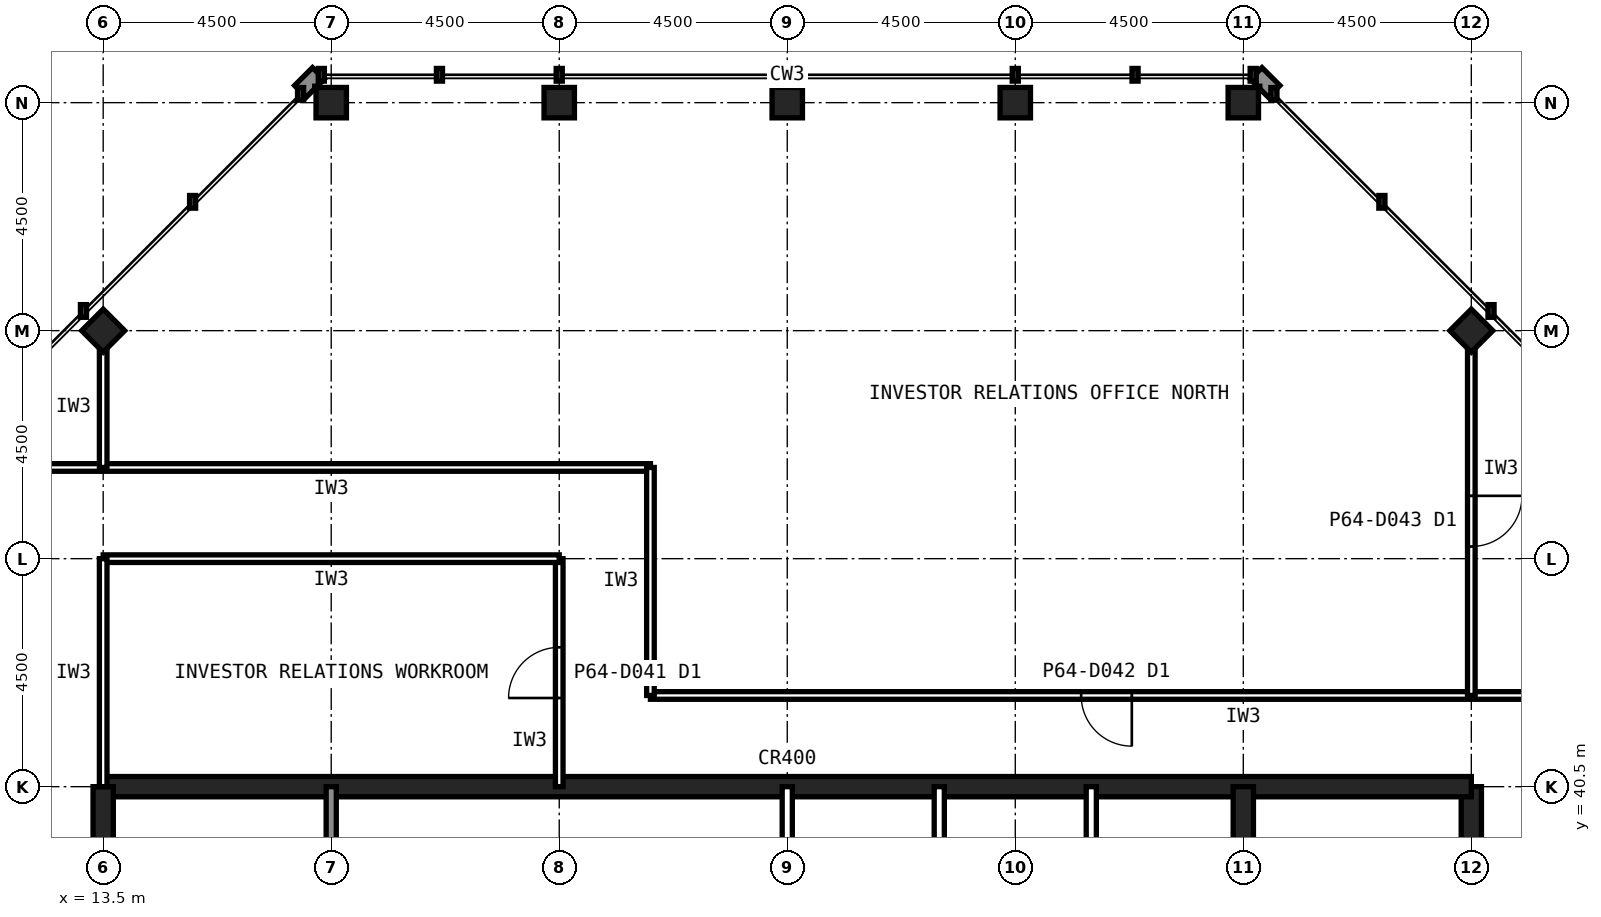
"""IFC4 building model, lengths in metres.
Left out: names, types, materials, properties, quantities, classifications, styles, units other than length and angle.
Written with IfcOpenShell. Run it as: python <this file> out.ifc"""

import sys

from ifc_helpers import new_model, si_unit, direction, frame, frame_2d, origin, origin_2d, place, context, subcontext, project, spatial, rectangle, hollow_rectangle, extrude, element, fill, save


model = new_model("IFC4")
c1 = context("Model", 3, precision=1e-05, world=origin(), true_north=direction((0.0, 1.0)))
c2 = subcontext(c1, "Body", "Model", "MODEL_VIEW")
j1 = project(units=[si_unit("LENGTHUNIT", "METRE"), si_unit("PLANEANGLEUNIT", "RADIAN")], contexts=[c1])
p1 = place(None, origin())
s1 = spatial("IfcSite", under=j1, at=p1, CompositionType="ELEMENT")
p2 = place(p1, origin())
s2 = spatial("IfcBuilding", under=s1, at=p2, CompositionType="ELEMENT")
p3 = place(p2, frame((0.0, 0.0, 270.6)))
s3 = spatial("IfcBuildingStorey", under=s2, at=p3, CompositionType="ELEMENT", Elevation=270.6)
for number, where, z_axis, x_axis in (
    (1, (36.0, 54.0, 0.0), (0.0, 0.0, 1.0), (1.0, 0.0, 0.0)),
    (2, (31.5, 54.0, 0.0), (0.0, 0.0, 1.0), (1.0, 0.0, 0.0)),
    (3, (27.0, 54.0, 0.0), (0.0, 0.0, 1.0), (1.0, 0.0, 0.0)),
    (4, (22.5, 54.0, 0.0), (0.0, 0.0, 1.0), (1.0, 0.0, 0.0)),
    (5, (18.0, 54.0, 0.0), (0.0, 0.0, 1.0), (1.0, 0.0, 0.0)),
    (6, (40.5, 49.5, 0.0), (0.0, 0.0, 1.0), (0.707, 0.707, 0.0)),
    (7, (13.5, 49.5, 0.0), (0.0, 0.0, 1.0), (0.707, 0.707, 0.0)),
):
    element("IfcColumn", number, at=place(p3, frame(where, z_axis=z_axis, x_axis=x_axis)), inside=s3, PredefinedType="COLUMN", context=c2, shape_type="SweptSolid", body=[
        extrude(hollow_rectangle(XDim=0.6, YDim=0.6, WallThickness=0.028, at=origin_2d()), origin(), (0.0, 0.0, 1.0), 4.0),
    ])
p4 = place(p3, frame((40.5, 13.5, 0.0), z_axis=(0.0, 0.0, 1.0), x_axis=(0.0, 1.0, 0.0)))
e8 = element("IfcWall", 8, at=p4, inside=s3, PredefinedType="SHEAR", context=c2, shape_type="SweptSolid", body=[
    extrude(rectangle(XDim=27.0, YDim=0.4, at=frame_2d((13.5, 0.0))), origin(), (0.0, 0.0, 1.0), 4.0),
])
p5 = place(p4, frame((5.85, 0.0, 0.0)))
e9 = element("IfcOpeningElement", 9, at=p5, cuts=e8, PredefinedType="OPENING", context=c2, shape_type="SweptSolid", body=[
    extrude(rectangle(XDim=1.8, YDim=2.1, at=frame_2d((0.9, 1.05))), frame((0.0, 0.21, 0.0), z_axis=(0.0, -1.0, 0.0), x_axis=(1.0, 0.0, 0.0)), (0.0, 0.0, 1.0), 0.42),
])
p6 = place(p4, frame((19.65, 0.0, 0.0)))
e10 = element("IfcOpeningElement", 10, at=p6, cuts=e8, PredefinedType="OPENING", context=c2, shape_type="SweptSolid", body=[
    extrude(rectangle(XDim=1.2, YDim=2.1, at=frame_2d((0.6, 1.05))), frame((0.0, 0.21, 0.0), z_axis=(0.0, -1.0, 0.0), x_axis=(1.0, 0.0, 0.0)), (0.0, 0.0, 1.0), 0.42),
])
p7 = place(p3, frame((40.5, 40.5, 0.0), z_axis=(0.0, 0.0, 1.0), x_axis=(-1.0, 0.0, 0.0)))
e11 = element("IfcWall", 11, at=p7, inside=s3, PredefinedType="SHEAR", context=c2, shape_type="SweptSolid", body=[
    extrude(rectangle(XDim=27.0, YDim=0.4, at=frame_2d((13.5, 0.0))), origin(), (0.0, 0.0, 1.0), 4.0),
])
p8 = place(p3, frame((13.5, 40.5, 0.0), z_axis=(0.0, 0.0, 1.0), x_axis=(0.0, -1.0, 0.0)))
e12 = element("IfcWall", 12, at=p8, inside=s3, PredefinedType="SHEAR", context=c2, shape_type="SweptSolid", body=[
    extrude(rectangle(XDim=27.0, YDim=0.4, at=frame_2d((13.5, 0.0))), origin(), (0.0, 0.0, 1.0), 4.0),
])
p9 = place(p8, frame((19.65, 0.0, 0.0)))
e13 = element("IfcOpeningElement", 13, at=p9, cuts=e12, PredefinedType="OPENING", context=c2, shape_type="SweptSolid", body=[
    extrude(rectangle(XDim=1.2, YDim=2.1, at=frame_2d((0.6, 1.05))), frame((0.0, 0.21, 0.0), z_axis=(0.0, -1.0, 0.0), x_axis=(1.0, 0.0, 0.0)), (0.0, 0.0, 1.0), 0.42),
])
p10 = place(p8, frame((5.85, 0.0, 0.0)))
e14 = element("IfcOpeningElement", 14, at=p10, cuts=e12, PredefinedType="OPENING", context=c2, shape_type="SweptSolid", body=[
    extrude(rectangle(XDim=1.8, YDim=2.1, at=frame_2d((0.9, 1.05))), frame((0.0, 0.21, 0.0), z_axis=(0.0, -1.0, 0.0), x_axis=(1.0, 0.0, 0.0)), (0.0, 0.0, 1.0), 0.42),
])
p11 = place(p3, frame((18.0, 36.0, 0.0), z_axis=(0.0, 0.0, 1.0), x_axis=(0.0, 1.0, 0.0)))
e15 = element("IfcWall", 15, at=p11, inside=s3, PredefinedType="SOLIDWALL", context=c2, shape_type="SweptSolid", body=[
    extrude(rectangle(XDim=4.5, YDim=0.2, at=frame_2d((2.25, 0.0))), origin(), (0.0, 0.0, 1.0), 3.84),
])
p12 = place(p3, frame((36.0, 22.5, 0.0), z_axis=(0.0, 0.0, 1.0), x_axis=(0.0, 1.0, 0.0)))
e16 = element("IfcWall", 16, at=p12, inside=s3, PredefinedType="SHEAR", context=c2, shape_type="SweptSolid", body=[
    extrude(rectangle(XDim=18.0, YDim=0.4, at=frame_2d((9.0, 0.0))), origin(), (0.0, 0.0, 1.0), 4.0),
])
for number, where, z_axis, x_axis in (
    (17, (27.0, 36.0, 0.0), (0.0, 0.0, 1.0), (0.0, 1.0, 0.0)),
    (18, (30.0, 36.0, 0.0), (0.0, 0.0, 1.0), (0.0, 1.0, 0.0)),
    (19, (33.0, 36.0, 0.0), (0.0, 0.0, 1.0), (0.0, 1.0, 0.0)),
):
    element("IfcWall", number, at=place(p3, frame(where, z_axis=z_axis, x_axis=x_axis)), inside=s3, PredefinedType="PARTITIONING", context=c2, shape_type="SweptSolid", body=[
        extrude(rectangle(XDim=4.5, YDim=0.2, at=frame_2d((2.25, 0.0))), origin(), (0.0, 0.0, 1.0), 3.84),
    ])
p13 = place(p3, frame((42.3, 42.3, 0.0), z_axis=(0.0, 0.0, 1.0), x_axis=(-1.0, 0.0, 0.0)))
e20 = element("IfcWall", 20, at=p13, inside=s3, PredefinedType="PARTITIONING", context=c2, shape_type="SweptSolid", body=[
    extrude(rectangle(XDim=18.0, YDim=0.15, at=frame_2d((9.0, 0.0))), origin(), (0.0, 0.0, 1.0), 3.84),
])
p14 = place(p13, frame((8.5, 0.0, 0.0)))
e21 = element("IfcOpeningElement", 21, at=p14, cuts=e20, PredefinedType="OPENING", context=c2, shape_type="SweptSolid", body=[
    extrude(rectangle(XDim=1.0, YDim=2.1, at=frame_2d((0.5, 1.05))), frame((0.0, 0.085, 0.0), z_axis=(0.0, -1.0, 0.0), x_axis=(1.0, 0.0, 0.0)), (0.0, 0.0, 1.0), 0.17),
])
p15 = place(p3, frame((24.3, 46.8, 0.0), z_axis=(0.0, 0.0, 1.0), x_axis=(-1.0, 0.0, 0.0)))
e22 = element("IfcWall", 22, at=p15, inside=s3, PredefinedType="PARTITIONING", context=c2, shape_type="SweptSolid", body=[
    extrude(rectangle(XDim=12.6, YDim=0.15, at=frame_2d((6.3, 0.0))), origin(), (0.0, 0.0, 1.0), 3.84),
])
p16 = place(p3, frame((24.3, 42.3, 0.0), z_axis=(0.0, 0.0, 1.0), x_axis=(0.0, 1.0, 0.0)))
e23 = element("IfcWall", 23, at=p16, inside=s3, PredefinedType="PARTITIONING", context=c2, shape_type="SweptSolid", body=[
    extrude(rectangle(XDim=4.5, YDim=0.15, at=frame_2d((2.25, 0.0))), origin(), (0.0, 0.0, 1.0), 3.84),
])
p17 = place(p3, frame((22.5, 40.5, 0.0), z_axis=(0.0, 0.0, 1.0), x_axis=(0.0, 1.0, 0.0)))
e24 = element("IfcWall", 24, at=p17, inside=s3, PredefinedType="PARTITIONING", context=c2, shape_type="SweptSolid", body=[
    extrude(rectangle(XDim=4.5, YDim=0.15, at=frame_2d((2.25, 0.0))), origin(), (0.0, 0.0, 1.0), 2.989),
])
p18 = place(p17, frame((1.75, 0.0, 0.0)))
e25 = element("IfcOpeningElement", 25, at=p18, cuts=e24, PredefinedType="OPENING", context=c2, shape_type="SweptSolid", body=[
    extrude(rectangle(XDim=1.0, YDim=2.1, at=frame_2d((0.5, 1.05))), frame((0.0, 0.085, 0.0), z_axis=(0.0, -1.0, 0.0), x_axis=(1.0, 0.0, 0.0)), (0.0, 0.0, 1.0), 0.17),
])
p19 = place(p3, frame((22.5, 45.0, 0.0), z_axis=(0.0, 0.0, 1.0), x_axis=(-1.0, 0.0, 0.0)))
e26 = element("IfcWall", 26, at=p19, inside=s3, PredefinedType="PARTITIONING", context=c2, shape_type="SweptSolid", body=[
    extrude(rectangle(XDim=9.0, YDim=0.15, at=frame_2d((4.5, 0.0))), origin(), (0.0, 0.0, 1.0), 3.84),
])
p20 = place(p3, frame((13.5, 45.0, 0.0), z_axis=(0.0, 0.0, 1.0), x_axis=(0.0, -1.0, 0.0)))
e27 = element("IfcWall", 27, at=p20, inside=s3, PredefinedType="PARTITIONING", context=c2, shape_type="SweptSolid", body=[
    extrude(rectangle(XDim=4.5, YDim=0.15, at=frame_2d((2.25, 0.0))), origin(), (0.0, 0.0, 1.0), 2.989),
])
p21 = place(p3, frame((40.5, 49.18, 0.0), z_axis=(0.0, 0.0, 1.0), x_axis=(0.0, -1.0, 0.0)))
e28 = element("IfcWall", 28, at=p21, inside=s3, PredefinedType="PARTITIONING", context=c2, shape_type="SweptSolid", body=[
    extrude(rectangle(XDim=6.88, YDim=0.15, at=frame_2d((3.44, 0.0))), origin(), (0.0, 0.0, 1.0), 2.989),
])
p22 = place(p21, frame((2.94, 0.0, 0.0)))
e29 = element("IfcOpeningElement", 29, at=p22, cuts=e28, PredefinedType="OPENING", context=c2, shape_type="SweptSolid", body=[
    extrude(rectangle(XDim=1.0, YDim=2.1, at=frame_2d((0.5, 1.05))), frame((0.0, 0.085, 0.0), z_axis=(0.0, -1.0, 0.0), x_axis=(1.0, 0.0, 0.0)), (0.0, 0.0, 1.0), 0.17),
])
p23 = place(p3, frame((13.5, 46.8, 0.0), z_axis=(0.0, 0.0, 1.0), x_axis=(0.0, 1.0, 0.0)))
e30 = element("IfcWall", 30, at=p23, inside=s3, PredefinedType="PARTITIONING", context=c2, shape_type="SweptSolid", body=[
    extrude(rectangle(XDim=2.38, YDim=0.15, at=frame_2d((1.19, 0.0))), origin(), (0.0, 0.0, 1.0), 2.989),
])
p24 = place(p14, origin())
e31 = element("IfcDoor", 31, at=p24, inside=s3, OperationType="SINGLE_SWING_LEFT", PredefinedType="DOOR", context=c2, shape_type="SweptSolid", body=[
    extrude(rectangle(XDim=1.0, YDim=2.1, at=frame_2d((0.5, 1.05))), frame((0.0, 0.025, 0.0), z_axis=(0.0, -1.0, 0.0), x_axis=(1.0, 0.0, 0.0)), (0.0, 0.0, 1.0), 0.05),
])
fill(e21, e31)
p25 = place(p18, origin())
e32 = element("IfcDoor", 32, at=p25, inside=s3, OperationType="SINGLE_SWING_LEFT", PredefinedType="DOOR", context=c2, shape_type="SweptSolid", body=[
    extrude(rectangle(XDim=1.0, YDim=2.1, at=frame_2d((0.5, 1.05))), frame((0.0, 0.025, 0.0), z_axis=(0.0, -1.0, 0.0), x_axis=(1.0, 0.0, 0.0)), (0.0, 0.0, 1.0), 0.05),
])
fill(e25, e32)
p26 = place(p22, origin())
e33 = element("IfcDoor", 33, at=p26, inside=s3, OperationType="SINGLE_SWING_LEFT", PredefinedType="DOOR", context=c2, shape_type="SweptSolid", body=[
    extrude(rectangle(XDim=1.0, YDim=2.1, at=frame_2d((0.5, 1.05))), frame((0.0, 0.025, 0.0), z_axis=(0.0, -1.0, 0.0), x_axis=(1.0, 0.0, 0.0)), (0.0, 0.0, 1.0), 0.05),
])
fill(e29, e33)
save(model, sys.argv[1])
